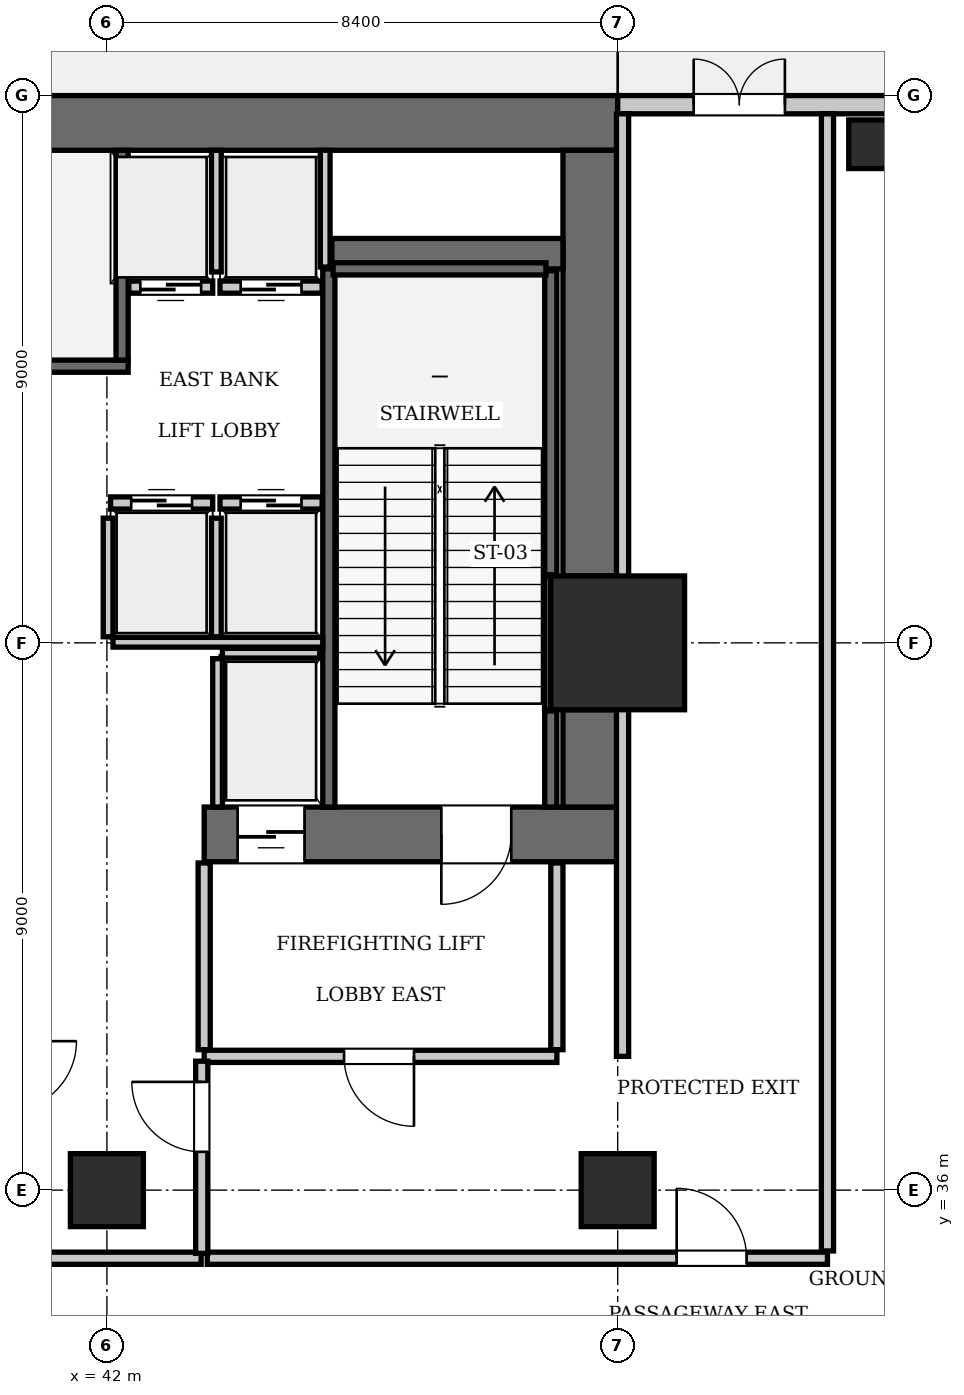
"""IFC4 building model, lengths in metres.
Left out: names, types, materials, properties, quantities, classifications, styles, units other than length and angle.
Written with IfcOpenShell. Run it as: python <this file> out.ifc"""

import sys

from ifc_helpers import new_model, si_unit, direction, frame, frame_2d, origin, origin_2d, place, context, subcontext, project, spatial, rectangle, extrude, element, fill, save


model = new_model("IFC4")
c1 = context("Model", 3, precision=1e-05, world=origin(), true_north=direction((0.0, 1.0)))
c2 = subcontext(c1, "Body", "Model", "MODEL_VIEW")
j1 = project(units=[si_unit("LENGTHUNIT", "METRE"), si_unit("PLANEANGLEUNIT", "RADIAN")], contexts=[c1])
p1 = place(None, origin())
s1 = spatial("IfcSite", under=j1, at=p1, CompositionType="ELEMENT")
p2 = place(p1, origin())
s2 = spatial("IfcBuilding", under=s1, at=p2, CompositionType="ELEMENT")
p3 = place(p2, origin())
s3 = spatial("IfcBuildingStorey", under=s2, at=p3, CompositionType="ELEMENT", Elevation=0.0)
p4 = place(p3, frame((50.4, 45.0, 0.0), z_axis=(0.0, 0.0, 1.0), x_axis=(1.0, 0.0, 0.0)))
e1 = element("IfcColumn", 1, at=p4, inside=s3, PredefinedType="COLUMN", context=c2, shape_type="SweptSolid", body=[
    extrude(rectangle(XDim=2.2, YDim=2.2, at=origin_2d()), origin(), (0.0, 0.0, 1.0), 5.6),
])
p5 = place(p3, frame((25.2, 53.55, 0.0), z_axis=(0.0, 0.0, 1.0), x_axis=(1.0, 0.0, 0.0)))
e2 = element("IfcWall", 2, at=p5, inside=s3, PredefinedType="SHEAR", context=c2, shape_type="SweptSolid", body=[
    extrude(rectangle(XDim=25.2, YDim=0.9, at=frame_2d((12.6, 0.0))), origin(), (0.0, 0.0, 1.0), 5.6),
])
p6 = place(p3, frame((43.6, 41.85, 0.0), z_axis=(0.0, 0.0, 1.0), x_axis=(1.0, 0.0, 0.0)))
e3 = element("IfcWall", 3, at=p6, inside=s3, PredefinedType="SHEAR", context=c2, shape_type="SweptSolid", body=[
    extrude(rectangle(XDim=6.8, YDim=0.9, at=frame_2d((3.4, 0.0))), origin(), (0.0, 0.0, 1.0), 5.6),
])
p7 = place(p6, frame((3.9, 0.0, 0.0)))
e4 = element("IfcOpeningElement", 4, at=p7, cuts=e3, PredefinedType="OPENING", context=c2, shape_type="SweptSolid", body=[
    extrude(rectangle(XDim=1.15, YDim=2.15, at=frame_2d((0.575, 1.075))), frame((0.0, 0.46, 0.0), z_axis=(0.0, -1.0, 0.0), x_axis=(1.0, 0.0, 0.0)), (0.0, 0.0, 1.0), 0.92),
])
p8 = place(p6, frame((0.55, 0.0, 0.0)))
e5 = element("IfcOpeningElement", 5, at=p8, cuts=e3, PredefinedType="OPENING", context=c2, shape_type="SweptSolid", body=[
    extrude(rectangle(XDim=1.1, YDim=2.2, at=frame_2d((0.55, 1.1))), frame((0.0, 0.46, 0.0), z_axis=(0.0, -1.0, 0.0), x_axis=(1.0, 0.0, 0.0)), (0.0, 0.0, 1.0), 0.92),
])
p9 = place(p3, frame((49.95, 42.3, 0.0), z_axis=(0.0, 0.0, 1.0), x_axis=(0.0, 1.0, 0.0)))
e6 = element("IfcWall", 6, at=p9, inside=s3, PredefinedType="SHEAR", context=c2, shape_type="SweptSolid", body=[
    extrude(rectangle(XDim=1.6, YDim=0.9, at=frame_2d((0.8, 0.0))), origin(), (0.0, 0.0, 1.0), 5.6),
])
p10 = place(p3, frame((49.95, 46.1, 0.0), z_axis=(0.0, 0.0, 1.0), x_axis=(0.0, 1.0, 0.0)))
e7 = element("IfcWall", 7, at=p10, inside=s3, PredefinedType="SHEAR", context=c2, shape_type="SweptSolid", body=[
    extrude(rectangle(XDim=7.0, YDim=0.9, at=frame_2d((3.5, 0.0))), origin(), (0.0, 0.0, 1.0), 5.6),
])
p11 = place(p3, frame((45.7, 51.4, 0.0), z_axis=(0.0, 0.0, 1.0), x_axis=(1.0, 0.0, 0.0)))
e8 = element("IfcWall", 8, at=p11, inside=s3, PredefinedType="SHEAR", context=c2, shape_type="SweptSolid", body=[
    extrude(rectangle(XDim=3.8, YDim=0.5, at=frame_2d((1.9, 0.0))), origin(), (0.0, 0.0, 1.0), 5.6),
])
for number, where, z_axis, x_axis in (
    (9, (42.0, 36.0, 0.0), (0.0, 0.0, 1.0), (1.0, 0.0, 0.0)),
    (10, (50.4, 36.0, 0.0), (0.0, 0.0, 1.0), (1.0, 0.0, 0.0)),
):
    element("IfcColumn", number, at=place(p3, frame(where, z_axis=z_axis, x_axis=x_axis)), inside=s3, PredefinedType="COLUMN", context=c2, shape_type="SweptSolid", body=[
        extrude(rectangle(XDim=1.2, YDim=1.2, at=origin_2d()), origin(), (0.0, 0.0, 1.0), 5.6),
    ])
p12 = place(p3, frame((54.6, 53.2, 0.0), z_axis=(0.0, 0.0, 1.0), x_axis=(1.0, 0.0, 0.0)))
e11 = element("IfcColumn", 11, at=p12, inside=s3, PredefinedType="PILASTER", context=c2, shape_type="SweptSolid", body=[
    extrude(rectangle(XDim=0.8, YDim=0.8, at=origin_2d()), origin(), (0.0, 0.0, 1.0), 5.6),
])
p13 = place(p3, frame((33.25, 49.55, 0.0), z_axis=(0.0, 0.0, 1.0), x_axis=(1.0, 0.0, 0.0)))
e12 = element("IfcWall", 12, at=p13, inside=s3, PredefinedType="SOLIDWALL", context=c2, shape_type="SweptSolid", body=[
    extrude(rectangle(XDim=9.1, YDim=0.2, at=frame_2d((4.55, 0.0))), origin(), (0.0, 0.0, 1.0), 5.32),
])
p14 = place(p3, frame((42.25, 49.65, 0.0), z_axis=(0.0, 0.0, 1.0), x_axis=(0.0, 1.0, 0.0)))
e13 = element("IfcWall", 13, at=p14, inside=s3, PredefinedType="SOLIDWALL", context=c2, shape_type="SweptSolid", body=[
    extrude(rectangle(XDim=3.45, YDim=0.2, at=frame_2d((1.725, 0.0))), origin(), (0.0, 0.0, 1.0), 5.32),
])
p15 = place(p3, frame((45.65, 42.3, 0.0), z_axis=(0.0, 0.0, 1.0), x_axis=(0.0, 1.0, 0.0)))
e14 = element("IfcWall", 14, at=p15, inside=s3, PredefinedType="SOLIDWALL", context=c2, shape_type="SweptSolid", body=[
    extrude(rectangle(XDim=8.85, YDim=0.2, at=frame_2d((4.425, 0.0))), origin(), (0.0, 0.0, 1.0), 5.32),
])
p16 = place(p3, frame((49.3, 42.3, 0.0), z_axis=(0.0, 0.0, 1.0), x_axis=(0.0, 1.0, 0.0)))
e15 = element("IfcWall", 15, at=p16, inside=s3, PredefinedType="SOLIDWALL", context=c2, shape_type="SweptSolid", body=[
    extrude(rectangle(XDim=1.58, YDim=0.2, at=frame_2d((0.79, 0.0))), origin(), (0.0, 0.0, 1.0), 5.32),
])
p17 = place(p3, frame((49.3, 46.12, 0.0), z_axis=(0.0, 0.0, 1.0), x_axis=(0.0, 1.0, 0.0)))
e16 = element("IfcWall", 16, at=p17, inside=s3, PredefinedType="SOLIDWALL", context=c2, shape_type="SweptSolid", body=[
    extrude(rectangle(XDim=5.0, YDim=0.2, at=frame_2d((2.5, 0.0))), origin(), (0.0, 0.0, 1.0), 5.32),
])
p18 = place(p3, frame((45.72, 51.15, 0.0), z_axis=(0.0, 0.0, 1.0), x_axis=(1.0, 0.0, 0.0)))
e17 = element("IfcWall", 17, at=p18, inside=s3, PredefinedType="SOLIDWALL", context=c2, shape_type="SweptSolid", body=[
    extrude(rectangle(XDim=3.5, YDim=0.2, at=frame_2d((1.75, 0.0))), origin(), (0.0, 0.0, 1.0), 5.32),
])
p19 = place(p3, frame((49.248, 43.9, 0.0), z_axis=(0.0, 0.0, 1.0), x_axis=(0.0, 1.0, 0.0)))
e18 = element("IfcWall", 18, at=p19, inside=s3, PredefinedType="SOLIDWALL", context=c2, shape_type="SweptSolid", body=[
    extrude(rectangle(XDim=2.2, YDim=0.1, at=frame_2d((1.1, 0.0))), origin(), (0.0, 0.0, 1.0), 5.32),
])
p20 = place(p3, frame((42.06, 47.3, 0.0), z_axis=(0.0, 0.0, 1.0), x_axis=(1.0, 0.0, 0.0)))
e19 = element("IfcWall", 19, at=p20, inside=s3, PredefinedType="SOLIDWALL", context=c2, shape_type="SweptSolid", body=[
    extrude(rectangle(XDim=1.68, YDim=0.2, at=frame_2d((0.84, 0.0))), origin(), (0.0, 0.0, 1.0), 5.32),
])
p21 = place(p20, frame((0.34, 0.0, 0.0)))
e20 = element("IfcOpeningElement", 20, at=p21, cuts=e19, PredefinedType="OPENING", context=c2, shape_type="SweptSolid", body=[
    extrude(rectangle(XDim=1.0, YDim=2.15, at=frame_2d((0.5, 1.075))), frame((0.0, 0.11, 0.0), z_axis=(0.0, -1.0, 0.0), x_axis=(1.0, 0.0, 0.0)), (0.0, 0.0, 1.0), 0.22),
])
p22 = place(p3, frame((43.86, 47.3, 0.0), z_axis=(0.0, 0.0, 1.0), x_axis=(1.0, 0.0, 0.0)))
e21 = element("IfcWall", 21, at=p22, inside=s3, PredefinedType="SOLIDWALL", context=c2, shape_type="SweptSolid", body=[
    extrude(rectangle(XDim=1.68, YDim=0.2, at=frame_2d((0.84, 0.0))), origin(), (0.0, 0.0, 1.0), 5.32),
])
p23 = place(p22, frame((0.34, 0.0, 0.0)))
e22 = element("IfcOpeningElement", 22, at=p23, cuts=e21, PredefinedType="OPENING", context=c2, shape_type="SweptSolid", body=[
    extrude(rectangle(XDim=1.0, YDim=2.15, at=frame_2d((0.5, 1.075))), frame((0.0, 0.11, 0.0), z_axis=(0.0, -1.0, 0.0), x_axis=(1.0, 0.0, 0.0)), (0.0, 0.0, 1.0), 0.22),
])
p24 = place(p3, frame((42.36, 50.85, 0.0), z_axis=(0.0, 0.0, 1.0), x_axis=(1.0, 0.0, 0.0)))
e23 = element("IfcWall", 23, at=p24, inside=s3, PredefinedType="SOLIDWALL", context=c2, shape_type="SweptSolid", body=[
    extrude(rectangle(XDim=1.38, YDim=0.2, at=frame_2d((0.69, 0.0))), origin(), (0.0, 0.0, 1.0), 5.32),
])
p25 = place(p24, frame((0.19, 0.0, 0.0)))
e24 = element("IfcOpeningElement", 24, at=p25, cuts=e23, PredefinedType="OPENING", context=c2, shape_type="SweptSolid", body=[
    extrude(rectangle(XDim=1.0, YDim=2.15, at=frame_2d((0.5, 1.075))), frame((0.0, 0.11, 0.0), z_axis=(0.0, -1.0, 0.0), x_axis=(1.0, 0.0, 0.0)), (0.0, 0.0, 1.0), 0.22),
])
p26 = place(p3, frame((43.86, 50.85, 0.0), z_axis=(0.0, 0.0, 1.0), x_axis=(1.0, 0.0, 0.0)))
e25 = element("IfcWall", 25, at=p26, inside=s3, PredefinedType="SOLIDWALL", context=c2, shape_type="SweptSolid", body=[
    extrude(rectangle(XDim=1.68, YDim=0.2, at=frame_2d((0.84, 0.0))), origin(), (0.0, 0.0, 1.0), 5.32),
])
p27 = place(p26, frame((0.34, 0.0, 0.0)))
e26 = element("IfcOpeningElement", 26, at=p27, cuts=e25, PredefinedType="OPENING", context=c2, shape_type="SweptSolid", body=[
    extrude(rectangle(XDim=1.0, YDim=2.15, at=frame_2d((0.5, 1.075))), frame((0.0, 0.11, 0.0), z_axis=(0.0, -1.0, 0.0), x_axis=(1.0, 0.0, 0.0)), (0.0, 0.0, 1.0), 0.22),
])
p28 = place(p3, frame((43.9, 44.83, 0.0), z_axis=(0.0, 0.0, 1.0), x_axis=(1.0, 0.0, 0.0)))
e27 = element("IfcWall", 27, at=p28, inside=s3, PredefinedType="SOLIDWALL", context=c2, shape_type="SweptSolid", body=[
    extrude(rectangle(XDim=1.6, YDim=0.16, at=frame_2d((0.8, 0.0))), origin(), (0.0, 0.0, 1.0), 5.32),
])
p29 = place(p3, frame((43.82, 42.3, 0.0), z_axis=(0.0, 0.0, 1.0), x_axis=(0.0, 1.0, 0.0)))
e28 = element("IfcWall", 28, at=p29, inside=s3, PredefinedType="SOLIDWALL", context=c2, shape_type="SweptSolid", body=[
    extrude(rectangle(XDim=2.44, YDim=0.16, at=frame_2d((1.22, 0.0))), origin(), (0.0, 0.0, 1.0), 5.32),
])
for number, where, z_axis, x_axis in (
    (29, (42.02, 45.1, 0.0), (0.0, 0.0, 1.0), (0.0, 1.0, 0.0)),
    (30, (43.8, 45.1, 0.0), (0.0, 0.0, 1.0), (0.0, 1.0, 0.0)),
):
    element("IfcWall", number, at=place(p3, frame(where, z_axis=z_axis, x_axis=x_axis)), inside=s3, PredefinedType="SOLIDWALL", context=c2, shape_type="SweptSolid", body=[
        extrude(rectangle(XDim=1.95, YDim=0.16, at=frame_2d((0.975, 0.0))), origin(), (0.0, 0.0, 1.0), 5.32),
    ])
p30 = place(p3, frame((42.1, 45.01, 0.0), z_axis=(0.0, 0.0, 1.0), x_axis=(1.0, 0.0, 0.0)))
e31 = element("IfcWall", 31, at=p30, inside=s3, PredefinedType="SOLIDWALL", context=c2, shape_type="SweptSolid", body=[
    extrude(rectangle(XDim=3.45, YDim=0.16, at=frame_2d((1.725, 0.0))), origin(), (0.0, 0.0, 1.0), 5.32),
])
p31 = place(p3, frame((45.59, 51.18, 0.0), z_axis=(0.0, 0.0, 1.0), x_axis=(0.0, 1.0, 0.0)))
e32 = element("IfcWall", 32, at=p31, inside=s3, PredefinedType="SOLIDWALL", context=c2, shape_type="SweptSolid", body=[
    extrude(rectangle(XDim=1.92, YDim=0.16, at=frame_2d((0.96, 0.0))), origin(), (0.0, 0.0, 1.0), 5.32),
])
p32 = place(p3, frame((43.8, 51.1, 0.0), z_axis=(0.0, 0.0, 1.0), x_axis=(0.0, 1.0, 0.0)))
e33 = element("IfcWall", 33, at=p32, inside=s3, PredefinedType="SOLIDWALL", context=c2, shape_type="SweptSolid", body=[
    extrude(rectangle(XDim=2.0, YDim=0.16, at=frame_2d((1.0, 0.0))), origin(), (0.0, 0.0, 1.0), 5.32),
])
p33 = place(p3, frame((50.4, 53.85, 0.0), z_axis=(0.0, 0.0, 1.0), x_axis=(1.0, 0.0, 0.0)))
e34 = element("IfcWall", 34, at=p33, inside=s3, PredefinedType="SOLIDWALL", context=c2, shape_type="SweptSolid", body=[
    extrude(rectangle(XDim=18.8, YDim=0.3, at=frame_2d((9.4, 0.0))), origin(), (0.0, 0.0, 1.0), 5.32),
])
p34 = place(p33, frame((1.25, 0.0, 0.0)))
e35 = element("IfcOpeningElement", 35, at=p34, cuts=e34, PredefinedType="OPENING", context=c2, shape_type="SweptSolid", body=[
    extrude(rectangle(XDim=1.5, YDim=2.2, at=frame_2d((0.75, 1.1))), frame((0.0, 0.16, 0.0), z_axis=(0.0, -1.0, 0.0), x_axis=(1.0, 0.0, 0.0)), (0.0, 0.0, 1.0), 0.32),
])
p35 = place(p33, frame((5.55, 0.0, 0.0)))
e36 = element("IfcOpeningElement", 36, at=p35, cuts=e34, PredefinedType="OPENING", context=c2, shape_type="SweptSolid", body=[
    extrude(rectangle(XDim=1.5, YDim=2.2, at=frame_2d((0.75, 1.1))), frame((0.0, 0.16, 0.0), z_axis=(0.0, -1.0, 0.0), x_axis=(1.0, 0.0, 0.0)), (0.0, 0.0, 1.0), 0.32),
])
p36 = place(p3, frame((43.6, 38.2, 0.0), z_axis=(0.0, 0.0, 1.0), x_axis=(1.0, 0.0, 0.0)))
e37 = element("IfcWall", 37, at=p36, inside=s3, PredefinedType="PARTITIONING", context=c2, shape_type="SweptSolid", body=[
    extrude(rectangle(XDim=5.8, YDim=0.2, at=frame_2d((2.9, 0.0))), origin(), (0.0, 0.0, 1.0), 5.32),
])
p37 = place(p36, frame((2.3, 0.0, 0.0)))
e38 = element("IfcOpeningElement", 38, at=p37, cuts=e37, PredefinedType="OPENING", context=c2, shape_type="SweptSolid", body=[
    extrude(rectangle(XDim=1.15, YDim=2.15, at=frame_2d((0.575, 1.075))), frame((0.0, 0.11, 0.0), z_axis=(0.0, -1.0, 0.0), x_axis=(1.0, 0.0, 0.0)), (0.0, 0.0, 1.0), 0.22),
])
for number, where, z_axis, x_axis in (
    (39, (43.6, 38.31, 0.0), (0.0, 0.0, 1.0), (0.0, 1.0, 0.0)),
    (40, (49.4, 38.31, 0.0), (0.0, 0.0, 1.0), (0.0, 1.0, 0.0)),
):
    element("IfcWall", number, at=place(p3, frame(where, z_axis=z_axis, x_axis=x_axis)), inside=s3, PredefinedType="PARTITIONING", context=c2, shape_type="SweptSolid", body=[
        extrude(rectangle(XDim=3.07, YDim=0.2, at=frame_2d((1.535, 0.0))), origin(), (0.0, 0.0, 1.0), 5.32),
    ])
p38 = place(p3, frame((43.65, 34.88, 0.0), z_axis=(0.0, 0.0, 1.0), x_axis=(1.0, 0.0, 0.0)))
e41 = element("IfcWall", 41, at=p38, inside=s3, PredefinedType="PARTITIONING", context=c2, shape_type="SweptSolid", body=[
    extrude(rectangle(XDim=10.2, YDim=0.2, at=frame_2d((5.1, 0.0))), origin(), (0.0, 0.0, 1.0), 5.32),
])
p39 = place(p38, frame((7.72, 0.0, 0.0)))
e42 = element("IfcOpeningElement", 42, at=p39, cuts=e41, PredefinedType="OPENING", context=c2, shape_type="SweptSolid", body=[
    extrude(rectangle(XDim=1.15, YDim=2.15, at=frame_2d((0.575, 1.075))), frame((0.0, 0.11, 0.0), z_axis=(0.0, -1.0, 0.0), x_axis=(1.0, 0.0, 0.0)), (0.0, 0.0, 1.0), 0.22),
])
p40 = place(p3, frame((53.85, 35.0, 0.0), z_axis=(0.0, 0.0, 1.0), x_axis=(0.0, 1.0, 0.0)))
e43 = element("IfcWall", 43, at=p40, inside=s3, PredefinedType="PARTITIONING", context=c2, shape_type="SweptSolid", body=[
    extrude(rectangle(XDim=18.7, YDim=0.2, at=frame_2d((9.35, 0.0))), origin(), (0.0, 0.0, 1.0), 5.32),
])
p41 = place(p3, frame((50.48, 38.2, 0.0), z_axis=(0.0, 0.0, 1.0), x_axis=(0.0, 1.0, 0.0)))
e44 = element("IfcWall", 44, at=p41, inside=s3, PredefinedType="PARTITIONING", context=c2, shape_type="SweptSolid", body=[
    extrude(rectangle(XDim=15.5, YDim=0.2, at=frame_2d((7.75, 0.0))), origin(), (0.0, 0.0, 1.0), 4.685),
])
p42 = place(p3, frame((40.4, 34.88, 0.0), z_axis=(0.0, 0.0, 1.0), x_axis=(1.0, 0.0, 0.0)))
e45 = element("IfcWall", 45, at=p42, inside=s3, PredefinedType="PARTITIONING", context=c2, shape_type="SweptSolid", body=[
    extrude(rectangle(XDim=3.15, YDim=0.2, at=frame_2d((1.575, 0.0))), origin(), (0.0, 0.0, 1.0), 5.32),
])
p43 = place(p3, frame((43.56, 34.96, 0.0), z_axis=(0.0, 0.0, 1.0), x_axis=(0.0, 1.0, 0.0)))
e46 = element("IfcWall", 46, at=p43, inside=s3, PredefinedType="PARTITIONING", context=c2, shape_type="SweptSolid", body=[
    extrude(rectangle(XDim=3.16, YDim=0.2, at=frame_2d((1.58, 0.0))), origin(), (0.0, 0.0, 1.0), 5.32),
])
p44 = place(p43, frame((1.67, 0.0, 0.0)))
e47 = element("IfcOpeningElement", 47, at=p44, cuts=e46, PredefinedType="OPENING", context=c2, shape_type="SweptSolid", body=[
    extrude(rectangle(XDim=1.15, YDim=2.15, at=frame_2d((0.575, 1.075))), frame((0.0, 0.11, 0.0), z_axis=(0.0, -1.0, 0.0), x_axis=(1.0, 0.0, 0.0)), (0.0, 0.0, 1.0), 0.22),
])
p45 = place(p7, frame((1.15, 0.0, 0.0), z_axis=(0.0, 0.0, 1.0), x_axis=(-1.0, 0.0, 0.0)))
e48 = element("IfcDoor", 48, at=p45, inside=s3, OperationType="SINGLE_SWING_RIGHT", PredefinedType="DOOR", context=c2, shape_type="SweptSolid", body=[
    extrude(rectangle(XDim=1.15, YDim=2.15, at=frame_2d((0.575, 1.075))), frame((0.0, 0.025, 0.0), z_axis=(0.0, -1.0, 0.0), x_axis=(1.0, 0.0, 0.0)), (0.0, 0.0, 1.0), 0.05),
])
fill(e4, e48)
p46 = place(p21, origin())
e49 = element("IfcDoor", 49, at=p46, inside=s3, OperationType="SLIDING_TO_LEFT", PredefinedType="DOOR", context=c2, shape_type="SweptSolid", body=[
    extrude(rectangle(XDim=1.0, YDim=2.15, at=frame_2d((0.5, 1.075))), frame((0.0, 0.025, 0.0), z_axis=(0.0, -1.0, 0.0), x_axis=(1.0, 0.0, 0.0)), (0.0, 0.0, 1.0), 0.05),
])
fill(e20, e49)
p47 = place(p23, origin())
e50 = element("IfcDoor", 50, at=p47, inside=s3, OperationType="SLIDING_TO_LEFT", PredefinedType="DOOR", context=c2, shape_type="SweptSolid", body=[
    extrude(rectangle(XDim=1.0, YDim=2.15, at=frame_2d((0.5, 1.075))), frame((0.0, 0.025, 0.0), z_axis=(0.0, -1.0, 0.0), x_axis=(1.0, 0.0, 0.0)), (0.0, 0.0, 1.0), 0.05),
])
fill(e22, e50)
p48 = place(p25, frame((1.0, 0.0, 0.0), z_axis=(0.0, 0.0, 1.0), x_axis=(-1.0, 0.0, 0.0)))
e51 = element("IfcDoor", 51, at=p48, inside=s3, OperationType="SLIDING_TO_LEFT", PredefinedType="DOOR", context=c2, shape_type="SweptSolid", body=[
    extrude(rectangle(XDim=1.0, YDim=2.15, at=frame_2d((0.5, 1.075))), frame((0.0, 0.025, 0.0), z_axis=(0.0, -1.0, 0.0), x_axis=(1.0, 0.0, 0.0)), (0.0, 0.0, 1.0), 0.05),
])
fill(e24, e51)
p49 = place(p27, frame((1.0, 0.0, 0.0), z_axis=(0.0, 0.0, 1.0), x_axis=(-1.0, 0.0, 0.0)))
e52 = element("IfcDoor", 52, at=p49, inside=s3, OperationType="SLIDING_TO_LEFT", PredefinedType="DOOR", context=c2, shape_type="SweptSolid", body=[
    extrude(rectangle(XDim=1.0, YDim=2.15, at=frame_2d((0.5, 1.075))), frame((0.0, 0.025, 0.0), z_axis=(0.0, -1.0, 0.0), x_axis=(1.0, 0.0, 0.0)), (0.0, 0.0, 1.0), 0.05),
])
fill(e26, e52)
p50 = place(p8, frame((1.1, 0.0, 0.0), z_axis=(0.0, 0.0, 1.0), x_axis=(-1.0, 0.0, 0.0)))
e53 = element("IfcDoor", 53, at=p50, inside=s3, OperationType="SLIDING_TO_LEFT", PredefinedType="DOOR", context=c2, shape_type="SweptSolid", body=[
    extrude(rectangle(XDim=1.1, YDim=2.2, at=frame_2d((0.55, 1.1))), frame((0.0, 0.025, 0.0), z_axis=(0.0, -1.0, 0.0), x_axis=(1.0, 0.0, 0.0)), (0.0, 0.0, 1.0), 0.05),
])
fill(e5, e53)
p51 = place(p34, origin())
e54 = element("IfcDoor", 54, at=p51, inside=s3, OperationType="DOUBLE_DOOR_SINGLE_SWING", PredefinedType="DOOR", context=c2, shape_type="SweptSolid", body=[
    extrude(rectangle(XDim=1.5, YDim=2.2, at=frame_2d((0.75, 1.1))), frame((0.0, 0.025, 0.0), z_axis=(0.0, -1.0, 0.0), x_axis=(1.0, 0.0, 0.0)), (0.0, 0.0, 1.0), 0.05),
])
fill(e35, e54)
p52 = place(p37, frame((1.15, 0.0, 0.0), z_axis=(0.0, 0.0, 1.0), x_axis=(-1.0, 0.0, 0.0)))
e55 = element("IfcDoor", 55, at=p52, inside=s3, OperationType="SINGLE_SWING_LEFT", PredefinedType="DOOR", context=c2, shape_type="SweptSolid", body=[
    extrude(rectangle(XDim=1.15, YDim=2.15, at=frame_2d((0.575, 1.075))), frame((0.0, 0.025, 0.0), z_axis=(0.0, -1.0, 0.0), x_axis=(1.0, 0.0, 0.0)), (0.0, 0.0, 1.0), 0.05),
])
fill(e38, e55)
p53 = place(p39, origin())
e56 = element("IfcDoor", 56, at=p53, inside=s3, OperationType="SINGLE_SWING_LEFT", PredefinedType="DOOR", context=c2, shape_type="SweptSolid", body=[
    extrude(rectangle(XDim=1.15, YDim=2.15, at=frame_2d((0.575, 1.075))), frame((0.0, 0.025, 0.0), z_axis=(0.0, -1.0, 0.0), x_axis=(1.0, 0.0, 0.0)), (0.0, 0.0, 1.0), 0.05),
])
fill(e42, e56)
p54 = place(p44, origin())
e57 = element("IfcDoor", 57, at=p54, inside=s3, OperationType="SINGLE_SWING_RIGHT", PredefinedType="DOOR", context=c2, shape_type="SweptSolid", body=[
    extrude(rectangle(XDim=1.15, YDim=2.15, at=frame_2d((0.575, 1.075))), frame((0.0, 0.025, 0.0), z_axis=(0.0, -1.0, 0.0), x_axis=(1.0, 0.0, 0.0)), (0.0, 0.0, 1.0), 0.05),
])
fill(e47, e57)
save(model, sys.argv[1])
